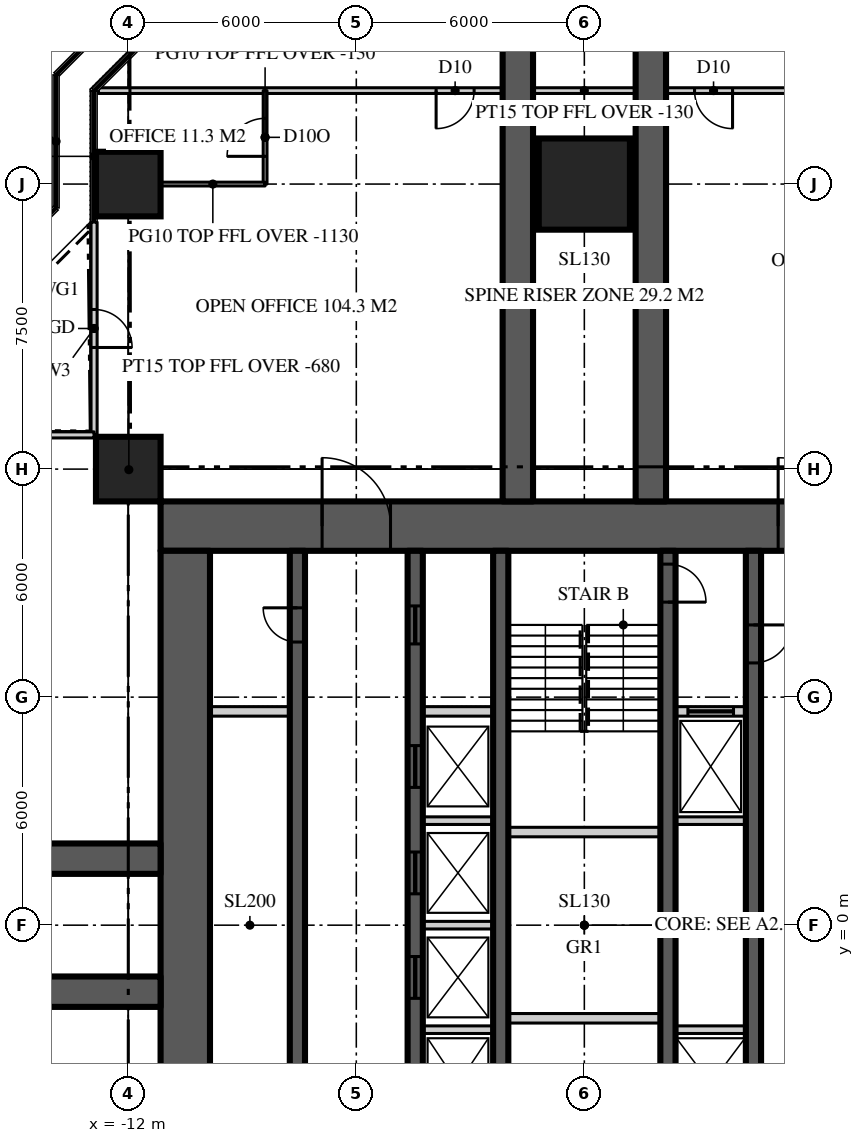
"""IFC4 building model, lengths in metres.
Left out: names, types, materials, properties, quantities, classifications, styles, units other than length and angle.
Written with IfcOpenShell. Run it as: python <this file> out.ifc"""

import sys

from ifc_helpers import new_model, si_unit, direction, frame, frame_2d, origin, origin_2d, place, context, subcontext, project, spatial, rectangle, extrude, element, fill, save


model = new_model("IFC4")
c1 = context("Model", 3, precision=1e-05, world=origin(), true_north=direction((0.0, 1.0)))
c2 = subcontext(c1, "Body", "Model", "MODEL_VIEW")
j1 = project(units=[si_unit("LENGTHUNIT", "METRE"), si_unit("PLANEANGLEUNIT", "RADIAN")], contexts=[c1])
p1 = place(None, origin())
s1 = spatial("IfcSite", under=j1, at=p1, CompositionType="ELEMENT")
p2 = place(p1, origin())
s2 = spatial("IfcBuilding", under=s1, at=p2, CompositionType="ELEMENT")
p3 = place(p2, frame((0.0, 0.0, 182.7)))
s3 = spatial("IfcBuildingStorey", under=s2, at=p3, CompositionType="ELEMENT", Elevation=182.7)
p4 = place(p3, frame((-11.15, 10.5, 0.0), z_axis=(0.0, 0.0, 1.0), x_axis=(1.0, 0.0, 0.0)))
e1 = element("IfcWall", 1, at=p4, inside=s3, PredefinedType="SHEAR", context=c2, shape_type="SweptSolid", body=[
    extrude(rectangle(XDim=22.3, YDim=1.3, at=frame_2d((11.15, 0.0))), origin(), (0.0, 0.0, 1.0), 3.9),
])
p5 = place(p4, frame((4.25, 0.0, 0.0)))
e2 = element("IfcOpeningElement", 2, at=p5, cuts=e1, PredefinedType="OPENING", context=c2, shape_type="SweptSolid", body=[
    extrude(rectangle(XDim=1.8, YDim=2.2, at=frame_2d((0.9, 1.1))), frame((0.0, 0.66, 0.0), z_axis=(0.0, -1.0, 0.0), x_axis=(1.0, 0.0, 0.0)), (0.0, 0.0, 1.0), 1.32),
])
p6 = place(p4, frame((16.25, 0.0, 0.0)))
e3 = element("IfcOpeningElement", 3, at=p6, cuts=e1, PredefinedType="OPENING", context=c2, shape_type="SweptSolid", body=[
    extrude(rectangle(XDim=1.8, YDim=2.2, at=frame_2d((0.9, 1.1))), frame((0.0, 0.66, 0.0), z_axis=(0.0, -1.0, 0.0), x_axis=(1.0, 0.0, 0.0)), (0.0, 0.0, 1.0), 1.32),
])
p7 = place(p3, frame((-10.5, 9.85, 0.0), z_axis=(0.0, 0.0, 1.0), x_axis=(0.0, -1.0, 0.0)))
e4 = element("IfcWall", 4, at=p7, inside=s3, PredefinedType="SHEAR", context=c2, shape_type="SweptSolid", body=[
    extrude(rectangle(XDim=19.7, YDim=1.3, at=frame_2d((9.85, 0.0))), origin(), (0.0, 0.0, 1.0), 3.9),
])
p8 = place(p7, frame((17.25, 0.0, 0.0)))
e5 = element("IfcOpeningElement", 5, at=p8, cuts=e4, PredefinedType="OPENING", context=c2, shape_type="SweptSolid", body=[
    extrude(rectangle(XDim=1.0, YDim=2.2, at=frame_2d((0.5, 1.1))), frame((0.0, 0.66, 0.0), z_axis=(0.0, -1.0, 0.0), x_axis=(1.0, 0.0, 0.0)), (0.0, 0.0, 1.0), 1.32),
])
for number, where, z_axis, x_axis in (
    (6, (1.75, 11.15, 0.0), (0.0, 0.0, 1.0), (0.0, 1.0, 0.0)),
    (7, (-1.75, 11.15, 0.0), (0.0, 0.0, 1.0), (0.0, 1.0, 0.0)),
    (8, (-11.15, 1.75, 0.0), (0.0, 0.0, 1.0), (-1.0, 0.0, 0.0)),
    (9, (-11.15, -1.75, 0.0), (0.0, 0.0, 1.0), (-1.0, 0.0, 0.0)),
):
    element("IfcWall", number, at=place(p3, frame(where, z_axis=z_axis, x_axis=x_axis)), inside=s3, PredefinedType="SHEAR", context=c2, shape_type="SweptSolid", body=[
        extrude(rectangle(XDim=15.25, YDim=0.8, at=frame_2d((7.625, 0.0))), origin(), (0.0, 0.0, 1.0), 3.9),
    ])
for number, where, z_axis, x_axis in (
    (10, (-12.0, 12.0, 0.0), (0.0, 0.0, 1.0), (1.0, 0.0, 0.0)),
    (11, (-12.0, 19.5, 0.0), (0.0, 0.0, 1.0), (1.0, 0.0, 0.0)),
):
    element("IfcColumn", number, at=place(p3, frame(where, z_axis=z_axis, x_axis=x_axis)), inside=s3, PredefinedType="COLUMN", context=c2, shape_type="SweptSolid", body=[
        extrude(rectangle(XDim=1.7, YDim=1.7, at=origin_2d()), origin(), (0.0, 0.0, 1.0), 3.9),
    ])
p9 = place(p3, frame((0.0, 19.5, 0.0), z_axis=(0.0, 0.0, 1.0), x_axis=(1.0, 0.0, 0.0)))
e12 = element("IfcColumn", 12, at=p9, inside=s3, PredefinedType="COLUMN", context=c2, shape_type="SweptSolid", body=[
    extrude(rectangle(XDim=2.4, YDim=2.4, at=origin_2d()), origin(), (0.0, 0.0, 1.0), 3.9),
])
p10 = place(p3, frame((-12.9, 18.5, 0.0), z_axis=(0.0, 0.0, 1.0), x_axis=(0.0, -1.0, 0.0)))
e13 = element("IfcWall", 13, at=p10, inside=s3, PredefinedType="SOLIDWALL", context=c2, shape_type="SweptSolid", body=[
    extrude(rectangle(XDim=5.6, YDim=0.16, at=frame_2d((2.8, 0.0))), origin(), (0.0, 0.0, 1.0), 3.77),
])
p11 = place(p10, frame((2.3, 0.0, 0.0)))
e14 = element("IfcOpeningElement", 14, at=p11, cuts=e13, PredefinedType="OPENING", context=c2, shape_type="SweptSolid", body=[
    extrude(rectangle(XDim=1.0, YDim=2.2, at=frame_2d((0.5, 1.1))), frame((0.0, 0.09, 0.0), z_axis=(0.0, -1.0, 0.0), x_axis=(1.0, 0.0, 0.0)), (0.0, 0.0, 1.0), 0.18),
])
p12 = place(p3, frame((-12.9, 12.9, 0.0), z_axis=(0.0, 0.0, 1.0), x_axis=(-1.0, 0.0, 0.0)))
e15 = element("IfcWall", 15, at=p12, inside=s3, PredefinedType="SOLIDWALL", context=c2, shape_type="SweptSolid", body=[
    extrude(rectangle(XDim=5.6, YDim=0.16, at=frame_2d((2.8, 0.0))), origin(), (0.0, 0.0, 1.0), 3.77),
])
p13 = place(p3, frame((-7.55, -9.85, 0.0), z_axis=(0.0, 0.0, 1.0), x_axis=(0.0, 1.0, 0.0)))
e16 = element("IfcWall", 16, at=p13, inside=s3, PredefinedType="SHEAR", context=c2, shape_type="SweptSolid", body=[
    extrude(rectangle(XDim=19.7, YDim=0.4, at=frame_2d((9.85, 0.0))), origin(), (0.0, 0.0, 1.0), 3.9),
])
p14 = place(p13, frame((1.45, 0.0, 0.0)))
e17 = element("IfcOpeningElement", 17, at=p14, cuts=e16, PredefinedType="OPENING", context=c2, shape_type="SweptSolid", body=[
    extrude(rectangle(XDim=1.0, YDim=2.2, at=frame_2d((0.5, 1.1))), frame((0.0, 0.21, 0.0), z_axis=(0.0, -1.0, 0.0), x_axis=(1.0, 0.0, 0.0)), (0.0, 0.0, 1.0), 0.42),
])
p15 = place(p13, frame((17.3, 0.0, 0.0)))
e18 = element("IfcOpeningElement", 18, at=p15, cuts=e16, PredefinedType="OPENING", context=c2, shape_type="SweptSolid", body=[
    extrude(rectangle(XDim=0.9, YDim=2.1, at=frame_2d((0.45, 1.05))), frame((0.0, 0.21, 0.0), z_axis=(0.0, -1.0, 0.0), x_axis=(1.0, 0.0, 0.0)), (0.0, 0.0, 1.0), 0.42),
])
p16 = place(p3, frame((-4.45, -9.85, 0.0), z_axis=(0.0, 0.0, 1.0), x_axis=(0.0, 1.0, 0.0)))
e19 = element("IfcWall", 19, at=p16, inside=s3, PredefinedType="SHEAR", context=c2, shape_type="SweptSolid", body=[
    extrude(rectangle(XDim=19.7, YDim=0.4, at=frame_2d((9.85, 0.0))), origin(), (0.0, 0.0, 1.0), 3.9),
])
p17 = place(p16, frame((1.95, 0.0, 0.0)))
e20 = element("IfcOpeningElement", 20, at=p17, cuts=e19, PredefinedType="OPENING", context=c2, shape_type="SweptSolid", body=[
    extrude(rectangle(XDim=1.0, YDim=2.2, at=frame_2d((0.5, 1.1))), frame((0.0, 0.21, 0.0), z_axis=(0.0, -1.0, 0.0), x_axis=(1.0, 0.0, 0.0)), (0.0, 0.0, 1.0), 0.42),
])
p18 = place(p16, frame((17.25, 0.0, 0.0)))
e21 = element("IfcOpeningElement", 21, at=p18, cuts=e19, PredefinedType="OPENING", context=c2, shape_type="SweptSolid", body=[
    extrude(rectangle(XDim=1.0, YDim=2.1, at=frame_2d((0.5, 1.05))), frame((0.0, 0.21, 0.0), z_axis=(0.0, -1.0, 0.0), x_axis=(1.0, 0.0, 0.0)), (0.0, 0.0, 1.0), 0.42),
])
p19 = place(p16, frame((7.925, 0.0, 0.0)))
e22 = element("IfcOpeningElement", 22, at=p19, cuts=e19, PredefinedType="OPENING", context=c2, shape_type="SweptSolid", body=[
    extrude(rectangle(XDim=1.1, YDim=2.2, at=frame_2d((0.55, 1.1))), frame((0.0, 0.21, 0.0), z_axis=(0.0, -1.0, 0.0), x_axis=(1.0, 0.0, 0.0)), (0.0, 0.0, 1.0), 0.42),
])
p20 = place(p16, frame((10.675, 0.0, 0.0)))
e23 = element("IfcOpeningElement", 23, at=p20, cuts=e19, PredefinedType="OPENING", context=c2, shape_type="SweptSolid", body=[
    extrude(rectangle(XDim=1.1, YDim=2.2, at=frame_2d((0.55, 1.1))), frame((0.0, 0.21, 0.0), z_axis=(0.0, -1.0, 0.0), x_axis=(1.0, 0.0, 0.0)), (0.0, 0.0, 1.0), 0.42),
])
p21 = place(p16, frame((13.475, 0.0, 0.0)))
e24 = element("IfcOpeningElement", 24, at=p21, cuts=e19, PredefinedType="OPENING", context=c2, shape_type="SweptSolid", body=[
    extrude(rectangle(XDim=1.1, YDim=2.2, at=frame_2d((0.55, 1.1))), frame((0.0, 0.21, 0.0), z_axis=(0.0, -1.0, 0.0), x_axis=(1.0, 0.0, 0.0)), (0.0, 0.0, 1.0), 0.42),
])
p22 = place(p3, frame((4.45, 9.85, 0.0), z_axis=(0.0, 0.0, 1.0), x_axis=(0.0, -1.0, 0.0)))
e25 = element("IfcWall", 25, at=p22, inside=s3, PredefinedType="SHEAR", context=c2, shape_type="SweptSolid", body=[
    extrude(rectangle(XDim=19.7, YDim=0.4, at=frame_2d((9.85, 0.0))), origin(), (0.0, 0.0, 1.0), 3.9),
])
p23 = place(p22, frame((1.95, 0.0, 0.0)))
e26 = element("IfcOpeningElement", 26, at=p23, cuts=e25, PredefinedType="OPENING", context=c2, shape_type="SweptSolid", body=[
    extrude(rectangle(XDim=1.0, YDim=2.2, at=frame_2d((0.5, 1.1))), frame((0.0, 0.21, 0.0), z_axis=(0.0, -1.0, 0.0), x_axis=(1.0, 0.0, 0.0)), (0.0, 0.0, 1.0), 0.42),
])
p24 = place(p22, frame((17.3, 0.0, 0.0)))
e27 = element("IfcOpeningElement", 27, at=p24, cuts=e25, PredefinedType="OPENING", context=c2, shape_type="SweptSolid", body=[
    extrude(rectangle(XDim=0.9, YDim=2.1, at=frame_2d((0.45, 1.05))), frame((0.0, 0.21, 0.0), z_axis=(0.0, -1.0, 0.0), x_axis=(1.0, 0.0, 0.0)), (0.0, 0.0, 1.0), 0.42),
])
p25 = place(p3, frame((-2.2, -9.85, 0.0), z_axis=(0.0, 0.0, 1.0), x_axis=(0.0, 1.0, 0.0)))
e28 = element("IfcWall", 28, at=p25, inside=s3, PredefinedType="SHEAR", context=c2, shape_type="SweptSolid", body=[
    extrude(rectangle(XDim=19.7, YDim=0.4, at=frame_2d((9.85, 0.0))), origin(), (0.0, 0.0, 1.0), 3.9),
])
p26 = place(p25, frame((0.35, 0.0, 0.0)))
e29 = element("IfcOpeningElement", 29, at=p26, cuts=e28, PredefinedType="OPENING", context=c2, shape_type="SweptSolid", body=[
    extrude(rectangle(XDim=1.0, YDim=2.2, at=frame_2d((0.5, 1.1))), frame((0.0, 0.21, 0.0), z_axis=(0.0, -1.0, 0.0), x_axis=(1.0, 0.0, 0.0)), (0.0, 0.0, 1.0), 0.42),
])
p27 = place(p3, frame((2.2, 9.85, 0.0), z_axis=(0.0, 0.0, 1.0), x_axis=(0.0, -1.0, 0.0)))
e30 = element("IfcWall", 30, at=p27, inside=s3, PredefinedType="SHEAR", context=c2, shape_type="SweptSolid", body=[
    extrude(rectangle(XDim=19.7, YDim=0.4, at=frame_2d((9.85, 0.0))), origin(), (0.0, 0.0, 1.0), 3.9),
])
p28 = place(p27, frame((0.35, 0.0, 0.0)))
e31 = element("IfcOpeningElement", 31, at=p28, cuts=e30, PredefinedType="OPENING", context=c2, shape_type="SweptSolid", body=[
    extrude(rectangle(XDim=1.0, YDim=2.2, at=frame_2d((0.5, 1.1))), frame((0.0, 0.21, 0.0), z_axis=(0.0, -1.0, 0.0), x_axis=(1.0, 0.0, 0.0)), (0.0, 0.0, 1.0), 0.42),
])
p29 = place(p3, frame((-9.85, 5.625, 0.0), z_axis=(0.0, 0.0, 1.0), x_axis=(1.0, 0.0, 0.0)))
e32 = element("IfcWall", 32, at=p29, inside=s3, PredefinedType="SOLIDWALL", context=c2, shape_type="SweptSolid", body=[
    extrude(rectangle(XDim=2.1, YDim=0.25, at=frame_2d((1.05, 0.0))), origin(), (0.0, 0.0, 1.0), 3.7),
])
p30 = place(p3, frame((-4.25, 5.625, 0.0), z_axis=(0.0, 0.0, 1.0), x_axis=(1.0, 0.0, 0.0)))
e33 = element("IfcWall", 33, at=p30, inside=s3, PredefinedType="SOLIDWALL", context=c2, shape_type="SweptSolid", body=[
    extrude(rectangle(XDim=1.85, YDim=0.25, at=frame_2d((0.925, 0.0))), origin(), (0.0, 0.0, 1.0), 3.7),
])
p31 = place(p3, frame((2.4, 5.625, 0.0), z_axis=(0.0, 0.0, 1.0), x_axis=(1.0, 0.0, 0.0)))
e34 = element("IfcWall", 34, at=p31, inside=s3, PredefinedType="SOLIDWALL", context=c2, shape_type="SweptSolid", body=[
    extrude(rectangle(XDim=1.85, YDim=0.25, at=frame_2d((0.925, 0.0))), origin(), (0.0, 0.0, 1.0), 3.7),
])
p32 = place(p31, frame((0.325, 0.0, 0.0)))
e35 = element("IfcOpeningElement", 35, at=p32, cuts=e34, PredefinedType="OPENING", context=c2, shape_type="SweptSolid", body=[
    extrude(rectangle(XDim=1.2, YDim=2.2, at=frame_2d((0.6, 1.1))), frame((0.0, 0.135, 0.0), z_axis=(0.0, -1.0, 0.0), x_axis=(1.0, 0.0, 0.0)), (0.0, 0.0, 1.0), 0.27),
])
for number, where, z_axis, x_axis in (
    (36, (-2.0, -2.45, 0.0), (0.0, 0.0, 1.0), (1.0, 0.0, 0.0)),
    (37, (-2.0, 2.45, 0.0), (0.0, 0.0, 1.0), (1.0, 0.0, 0.0)),
):
    element("IfcWall", number, at=place(p3, frame(where, z_axis=z_axis, x_axis=x_axis)), inside=s3, PredefinedType="SOLIDWALL", context=c2, shape_type="SweptSolid", body=[
        extrude(rectangle(XDim=4.0, YDim=0.25, at=frame_2d((2.0, 0.0))), origin(), (0.0, 0.0, 1.0), 3.7),
    ])
for number, where, z_axis, x_axis in (
    (38, (-4.25, -2.75, 0.0), (0.0, 0.0, 1.0), (1.0, 0.0, 0.0)),
    (39, (2.4, -2.75, 0.0), (0.0, 0.0, 1.0), (1.0, 0.0, 0.0)),
    (40, (-4.25, 0.0, 0.0), (0.0, 0.0, 1.0), (1.0, 0.0, 0.0)),
    (41, (-4.25, 2.75, 0.0), (0.0, 0.0, 1.0), (1.0, 0.0, 0.0)),
    (42, (2.4, 2.75, 0.0), (0.0, 0.0, 1.0), (1.0, 0.0, 0.0)),
):
    element("IfcWall", number, at=place(p3, frame(where, z_axis=z_axis, x_axis=x_axis)), inside=s3, PredefinedType="SOLIDWALL", context=c2, shape_type="SweptSolid", body=[
        extrude(rectangle(XDim=1.85, YDim=0.2, at=frame_2d((0.925, 0.0))), origin(), (0.0, 0.0, 1.0), 3.7),
    ])
p33 = place(p3, frame((12.786, 21.959, 0.0), z_axis=(0.0, 0.0, 1.0), x_axis=(-1.0, 0.0, 0.0)))
e43 = element("IfcWall", 43, at=p33, inside=s3, PredefinedType="PARTITIONING", context=c2, shape_type="SweptSolid", body=[
    extrude(rectangle(XDim=25.573, YDim=0.15, at=frame_2d((12.786, 0.0))), origin(), (0.0, 0.0, 1.0), 3.77),
])
p34 = place(p33, frame((15.687, 0.0, 0.0)))
e44 = element("IfcOpeningElement", 44, at=p34, cuts=e43, PredefinedType="OPENING", context=c2, shape_type="SweptSolid", body=[
    extrude(rectangle(XDim=1.0, YDim=2.2, at=frame_2d((0.5, 1.1))), frame((0.0, 0.085, 0.0), z_axis=(0.0, -1.0, 0.0), x_axis=(1.0, 0.0, 0.0)), (0.0, 0.0, 1.0), 0.17),
])
p35 = place(p33, frame((8.886, 0.0, 0.0)))
e45 = element("IfcOpeningElement", 45, at=p35, cuts=e43, PredefinedType="OPENING", context=c2, shape_type="SweptSolid", body=[
    extrude(rectangle(XDim=1.0, YDim=2.2, at=frame_2d((0.5, 1.1))), frame((0.0, 0.085, 0.0), z_axis=(0.0, -1.0, 0.0), x_axis=(1.0, 0.0, 0.0)), (0.0, 0.0, 1.0), 0.17),
])
p36 = place(p3, frame((-8.4, 19.5, 0.0), z_axis=(0.0, 0.0, 1.0), x_axis=(0.0, 1.0, 0.0)))
e46 = element("IfcWall", 46, at=p36, inside=s3, PredefinedType="PARTITIONING", context=c2, shape_type="SweptSolid", body=[
    extrude(rectangle(XDim=2.459, YDim=0.1, at=frame_2d((1.229, 0.0))), origin(), (0.0, 0.0, 1.0), 3.77),
])
p37 = place(p36, frame((0.729, 0.0, 0.0)))
e47 = element("IfcOpeningElement", 47, at=p37, cuts=e46, PredefinedType="OPENING", context=c2, shape_type="SweptSolid", body=[
    extrude(rectangle(XDim=1.0, YDim=2.2, at=frame_2d((0.5, 1.1))), frame((0.0, 0.06, 0.0), z_axis=(0.0, -1.0, 0.0), x_axis=(1.0, 0.0, 0.0)), (0.0, 0.0, 1.0), 0.12),
])
p38 = place(p3, frame((-8.4, 19.5, 0.0), z_axis=(0.0, 0.0, 1.0), x_axis=(-1.0, 0.0, 0.0)))
e48 = element("IfcWall", 48, at=p38, inside=s3, PredefinedType="PARTITIONING", context=c2, shape_type="SweptSolid", body=[
    extrude(rectangle(XDim=2.75, YDim=0.1, at=frame_2d((1.375, 0.0))), origin(), (0.0, 0.0, 1.0), 2.77),
])
p39 = place(p3, frame((-11.15, 11.15, 0.0), z_axis=(0.0, 0.0, 1.0), x_axis=(-0.707106781187, 0.707106781187, 0.0)))
e49 = element("IfcWall", 49, at=p39, inside=s3, PredefinedType="PARTITIONING", context=c2, shape_type="SweptSolid", body=[
    extrude(rectangle(XDim=2.362, YDim=0.15, at=frame_2d((1.181, 0.0))), origin(), (0.0, 0.0, 1.0), 3.22),
])
p40 = place(p11, origin())
e50 = element("IfcDoor", 50, at=p40, inside=s3, OperationType="SINGLE_SWING_RIGHT", PredefinedType="DOOR", context=c2, shape_type="SweptSolid", body=[
    extrude(rectangle(XDim=1.0, YDim=2.2, at=frame_2d((0.5, 1.1))), frame((0.0, 0.025, 0.0), z_axis=(0.0, -1.0, 0.0), x_axis=(1.0, 0.0, 0.0)), (0.0, 0.0, 1.0), 0.05),
])
fill(e14, e50)
p41 = place(p5, origin())
e51 = element("IfcDoor", 51, at=p41, inside=s3, OperationType="DOUBLE_DOOR_DOUBLE_SWING", PredefinedType="DOOR", context=c2, shape_type="SweptSolid", body=[
    extrude(rectangle(XDim=1.8, YDim=2.2, at=frame_2d((0.9, 1.1))), frame((0.0, 0.025, 0.0), z_axis=(0.0, -1.0, 0.0), x_axis=(1.0, 0.0, 0.0)), (0.0, 0.0, 1.0), 0.05),
])
fill(e2, e51)
p42 = place(p6, origin())
e52 = element("IfcDoor", 52, at=p42, inside=s3, OperationType="DOUBLE_DOOR_DOUBLE_SWING", PredefinedType="DOOR", context=c2, shape_type="SweptSolid", body=[
    extrude(rectangle(XDim=1.8, YDim=2.2, at=frame_2d((0.9, 1.1))), frame((0.0, 0.025, 0.0), z_axis=(0.0, -1.0, 0.0), x_axis=(1.0, 0.0, 0.0)), (0.0, 0.0, 1.0), 0.05),
])
fill(e3, e52)
p43 = place(p23, origin())
e53 = element("IfcDoor", 53, at=p43, inside=s3, OperationType="SINGLE_SWING_LEFT", PredefinedType="DOOR", context=c2, shape_type="SweptSolid", body=[
    extrude(rectangle(XDim=1.0, YDim=2.2, at=frame_2d((0.5, 1.1))), frame((0.0, 0.025, 0.0), z_axis=(0.0, -1.0, 0.0), x_axis=(1.0, 0.0, 0.0)), (0.0, 0.0, 1.0), 0.05),
])
fill(e26, e53)
p44 = place(p28, origin())
e54 = element("IfcDoor", 54, at=p44, inside=s3, OperationType="SINGLE_SWING_RIGHT", PredefinedType="DOOR", context=c2, shape_type="SweptSolid", body=[
    extrude(rectangle(XDim=1.0, YDim=2.2, at=frame_2d((0.5, 1.1))), frame((0.0, 0.025, 0.0), z_axis=(0.0, -1.0, 0.0), x_axis=(1.0, 0.0, 0.0)), (0.0, 0.0, 1.0), 0.05),
])
fill(e31, e54)
p45 = place(p15, origin())
e55 = element("IfcDoor", 55, at=p45, inside=s3, OperationType="SINGLE_SWING_RIGHT", PredefinedType="DOOR", context=c2, shape_type="SweptSolid", body=[
    extrude(rectangle(XDim=0.9, YDim=2.1, at=frame_2d((0.45, 1.05))), frame((0.0, 0.025, 0.0), z_axis=(0.0, -1.0, 0.0), x_axis=(1.0, 0.0, 0.0)), (0.0, 0.0, 1.0), 0.05),
])
fill(e18, e55)
p46 = place(p18, origin())
e56 = element("IfcDoor", 56, at=p46, inside=s3, OperationType="SLIDING_TO_LEFT", PredefinedType="DOOR", context=c2, shape_type="SweptSolid", body=[
    extrude(rectangle(XDim=1.0, YDim=2.1, at=frame_2d((0.5, 1.05))), frame((0.0, 0.025, 0.0), z_axis=(0.0, -1.0, 0.0), x_axis=(1.0, 0.0, 0.0)), (0.0, 0.0, 1.0), 0.05),
])
fill(e21, e56)
p47 = place(p19, origin())
e57 = element("IfcDoor", 57, at=p47, inside=s3, OperationType="SLIDING_TO_LEFT", PredefinedType="DOOR", context=c2, shape_type="SweptSolid", body=[
    extrude(rectangle(XDim=1.1, YDim=2.2, at=frame_2d((0.55, 1.1))), frame((0.0, 0.025, 0.0), z_axis=(0.0, -1.0, 0.0), x_axis=(1.0, 0.0, 0.0)), (0.0, 0.0, 1.0), 0.05),
])
fill(e22, e57)
p48 = place(p20, origin())
e58 = element("IfcDoor", 58, at=p48, inside=s3, OperationType="SLIDING_TO_LEFT", PredefinedType="DOOR", context=c2, shape_type="SweptSolid", body=[
    extrude(rectangle(XDim=1.1, YDim=2.2, at=frame_2d((0.55, 1.1))), frame((0.0, 0.025, 0.0), z_axis=(0.0, -1.0, 0.0), x_axis=(1.0, 0.0, 0.0)), (0.0, 0.0, 1.0), 0.05),
])
fill(e23, e58)
p49 = place(p21, origin())
e59 = element("IfcDoor", 59, at=p49, inside=s3, OperationType="SLIDING_TO_LEFT", PredefinedType="DOOR", context=c2, shape_type="SweptSolid", body=[
    extrude(rectangle(XDim=1.1, YDim=2.2, at=frame_2d((0.55, 1.1))), frame((0.0, 0.025, 0.0), z_axis=(0.0, -1.0, 0.0), x_axis=(1.0, 0.0, 0.0)), (0.0, 0.0, 1.0), 0.05),
])
fill(e24, e59)
p50 = place(p32, origin())
e60 = element("IfcDoor", 60, at=p50, inside=s3, OperationType="SLIDING_TO_LEFT", PredefinedType="DOOR", context=c2, shape_type="SweptSolid", body=[
    extrude(rectangle(XDim=1.2, YDim=2.2, at=frame_2d((0.6, 1.1))), frame((0.0, 0.025, 0.0), z_axis=(0.0, -1.0, 0.0), x_axis=(1.0, 0.0, 0.0)), (0.0, 0.0, 1.0), 0.05),
])
fill(e35, e60)
p51 = place(p34, origin())
e61 = element("IfcDoor", 61, at=p51, inside=s3, OperationType="SINGLE_SWING_RIGHT", PredefinedType="DOOR", context=c2, shape_type="SweptSolid", body=[
    extrude(rectangle(XDim=1.0, YDim=2.2, at=frame_2d((0.5, 1.1))), frame((0.0, 0.025, 0.0), z_axis=(0.0, -1.0, 0.0), x_axis=(1.0, 0.0, 0.0)), (0.0, 0.0, 1.0), 0.05),
])
fill(e44, e61)
p52 = place(p35, origin())
e62 = element("IfcDoor", 62, at=p52, inside=s3, OperationType="SINGLE_SWING_LEFT", PredefinedType="DOOR", context=c2, shape_type="SweptSolid", body=[
    extrude(rectangle(XDim=1.0, YDim=2.2, at=frame_2d((0.5, 1.1))), frame((0.0, 0.025, 0.0), z_axis=(0.0, -1.0, 0.0), x_axis=(1.0, 0.0, 0.0)), (0.0, 0.0, 1.0), 0.05),
])
fill(e45, e62)
p53 = place(p37, origin())
e63 = element("IfcDoor", 63, at=p53, inside=s3, OperationType="SINGLE_SWING_LEFT", PredefinedType="DOOR", context=c2, shape_type="SweptSolid", body=[
    extrude(rectangle(XDim=1.0, YDim=2.2, at=frame_2d((0.5, 1.1))), frame((0.0, 0.025, 0.0), z_axis=(0.0, -1.0, 0.0), x_axis=(1.0, 0.0, 0.0)), (0.0, 0.0, 1.0), 0.05),
])
fill(e47, e63)
save(model, sys.argv[1])
